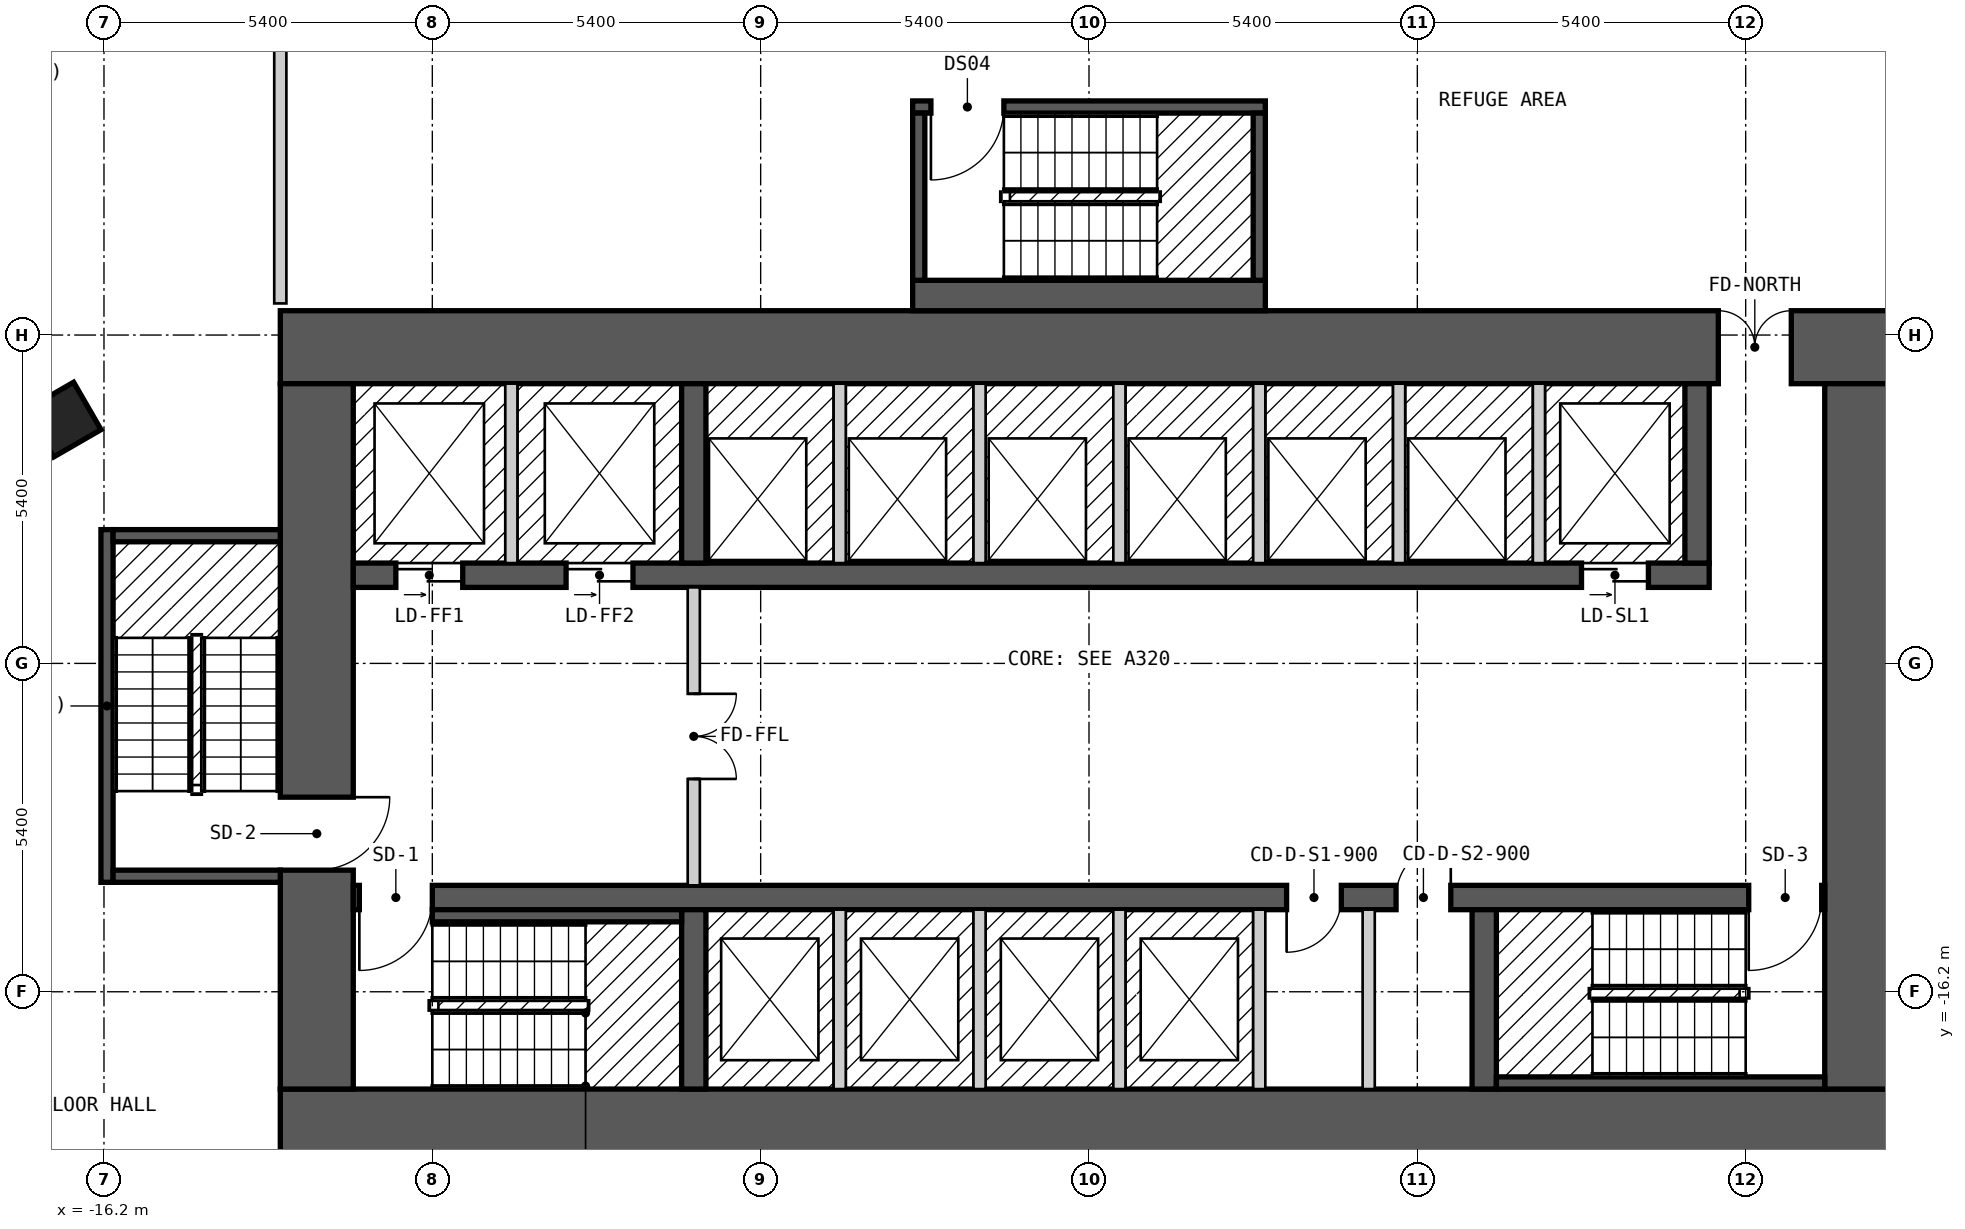
"""IFC4 building model, lengths in metres.
Left out: names, types, materials, properties, quantities, classifications, styles, units other than length and angle.
Written with IfcOpenShell. Run it as: python <this file> out.ifc"""

import sys

from ifc_helpers import new_model, si_unit, direction, frame, frame_2d, origin, origin_2d, place, context, subcontext, project, spatial, rectangle, extrude, element, fill, save


model = new_model("IFC4")
c1 = context("Model", 3, precision=1e-05, world=origin(), true_north=direction((0.0, 1.0)))
c2 = subcontext(c1, "Body", "Model", "MODEL_VIEW")
j1 = project(units=[si_unit("LENGTHUNIT", "METRE"), si_unit("PLANEANGLEUNIT", "RADIAN")], contexts=[c1])
p1 = place(None, origin())
s1 = spatial("IfcSite", under=j1, at=p1, CompositionType="ELEMENT")
p2 = place(p1, origin())
s2 = spatial("IfcBuilding", under=s1, at=p2, CompositionType="ELEMENT")
p3 = place(p2, frame((0.0, 0.0, 62.4)))
s3 = spatial("IfcBuildingStorey", under=s2, at=p3, CompositionType="ELEMENT", Elevation=62.4)
p4 = place(p3, frame((-16.864, -6.791, 0.0), z_axis=(0.0, 0.0, 1.0), x_axis=(0.499984884929, -0.866034130299, 0.0)))
e1 = element("IfcColumn", 1, at=p4, inside=s3, PredefinedType="COLUMN", context=c2, shape_type="SweptSolid", body=[
    extrude(rectangle(XDim=0.9, YDim=0.9, at=origin_2d()), origin(), (0.0, 0.0, 1.0), 3.6),
])
p5 = place(p3, frame((-13.3, -18.4, 0.0), z_axis=(0.0, 0.0, 1.0), x_axis=(1.0, 0.0, 0.0)))
e2 = element("IfcWall", 2, at=p5, inside=s3, PredefinedType="SHEAR", context=c2, shape_type="SweptSolid", body=[
    extrude(rectangle(XDim=26.6, YDim=1.2, at=frame_2d((13.3, 0.0))), origin(), (0.0, 0.0, 1.0), 2.6),
])
p6 = place(p3, frame((-13.3, -5.6, 0.0), z_axis=(0.0, 0.0, 1.0), x_axis=(1.0, 0.0, 0.0)))
e3 = element("IfcWall", 3, at=p6, inside=s3, PredefinedType="SHEAR", context=c2, shape_type="SweptSolid", body=[
    extrude(rectangle(XDim=26.6, YDim=1.2, at=frame_2d((13.3, 0.0))), origin(), (0.0, 0.0, 1.0), 2.6),
])
p7 = place(p6, frame((23.65, 0.0, 0.0)))
e4 = element("IfcOpeningElement", 4, at=p7, cuts=e3, PredefinedType="OPENING", context=c2, shape_type="SweptSolid", body=[
    extrude(rectangle(XDim=1.2, YDim=2.1, at=frame_2d((0.6, 1.05))), frame((0.0, 0.61, 0.0), z_axis=(0.0, -1.0, 0.0), x_axis=(1.0, 0.0, 0.0)), (0.0, 0.0, 1.0), 1.22),
])
p8 = place(p3, frame((-12.7, -17.8, 0.0), z_axis=(0.0, 0.0, 1.0), x_axis=(0.0, 1.0, 0.0)))
e5 = element("IfcWall", 5, at=p8, inside=s3, PredefinedType="SHEAR", context=c2, shape_type="SweptSolid", body=[
    extrude(rectangle(XDim=11.6, YDim=1.2, at=frame_2d((5.8, 0.0))), origin(), (0.0, 0.0, 1.0), 2.6),
])
p9 = place(p8, frame((3.6, 0.0, 0.0)))
e6 = element("IfcOpeningElement", 6, at=p9, cuts=e5, PredefinedType="OPENING", context=c2, shape_type="SweptSolid", body=[
    extrude(rectangle(XDim=1.2, YDim=2.1, at=frame_2d((0.6, 1.05))), frame((0.0, 0.61, 0.0), z_axis=(0.0, -1.0, 0.0), x_axis=(1.0, 0.0, 0.0)), (0.0, 0.0, 1.0), 1.22),
])
p10 = place(p3, frame((12.7, -17.8, 0.0), z_axis=(0.0, 0.0, 1.0), x_axis=(0.0, 1.0, 0.0)))
e7 = element("IfcWall", 7, at=p10, inside=s3, PredefinedType="SHEAR", context=c2, shape_type="SweptSolid", body=[
    extrude(rectangle(XDim=11.6, YDim=1.2, at=frame_2d((5.8, 0.0))), origin(), (0.0, 0.0, 1.0), 2.6),
])
p11 = place(p3, frame((-12.1, -14.65, 0.0), z_axis=(0.0, 0.0, 1.0), x_axis=(1.0, 0.0, 0.0)))
e8 = element("IfcWall", 8, at=p11, inside=s3, PredefinedType="SHEAR", context=c2, shape_type="SweptSolid", body=[
    extrude(rectangle(XDim=24.2, YDim=0.4, at=frame_2d((12.1, 0.0))), origin(), (0.0, 0.0, 1.0), 2.6),
])
p12 = place(p11, frame((1.3, 0.0, 0.0), z_axis=(0.0, 0.0, 1.0), x_axis=(-1.0, 0.0, 0.0)))
e9 = element("IfcOpeningElement", 9, at=p12, cuts=e8, PredefinedType="OPENING", context=c2, shape_type="SweptSolid", body=[
    extrude(rectangle(XDim=1.2, YDim=2.1, at=frame_2d((0.6, 1.05))), frame((0.0, 0.21, 0.0), z_axis=(0.0, -1.0, 0.0), x_axis=(1.0, 0.0, 0.0)), (0.0, 0.0, 1.0), 0.42),
])
p13 = place(p11, frame((24.15, 0.0, 0.0), z_axis=(0.0, 0.0, 1.0), x_axis=(-1.0, 0.0, 0.0)))
e10 = element("IfcOpeningElement", 10, at=p13, cuts=e8, PredefinedType="OPENING", context=c2, shape_type="SweptSolid", body=[
    extrude(rectangle(XDim=1.2, YDim=2.1, at=frame_2d((0.6, 1.05))), frame((0.0, 0.21, 0.0), z_axis=(0.0, -1.0, 0.0), x_axis=(1.0, 0.0, 0.0)), (0.0, 0.0, 1.0), 0.42),
])
p14 = place(p11, frame((16.25, 0.0, 0.0), z_axis=(0.0, 0.0, 1.0), x_axis=(-1.0, 0.0, 0.0)))
e11 = element("IfcOpeningElement", 11, at=p14, cuts=e8, PredefinedType="OPENING", context=c2, shape_type="SweptSolid", body=[
    extrude(rectangle(XDim=0.9, YDim=2.1, at=frame_2d((0.45, 1.05))), frame((0.0, 0.21, 0.0), z_axis=(0.0, -1.0, 0.0), x_axis=(1.0, 0.0, 0.0)), (0.0, 0.0, 1.0), 0.42),
])
p15 = place(p11, frame((18.05, 0.0, 0.0), z_axis=(0.0, 0.0, 1.0), x_axis=(-1.0, 0.0, 0.0)))
e12 = element("IfcOpeningElement", 12, at=p15, cuts=e8, PredefinedType="OPENING", context=c2, shape_type="SweptSolid", body=[
    extrude(rectangle(XDim=0.9, YDim=2.1, at=frame_2d((0.45, 1.05))), frame((0.0, 0.21, 0.0), z_axis=(0.0, -1.0, 0.0), x_axis=(1.0, 0.0, 0.0)), (0.0, 0.0, 1.0), 0.42),
])
p16 = place(p3, frame((-12.1, -9.35, 0.0), z_axis=(0.0, 0.0, 1.0), x_axis=(1.0, 0.0, 0.0)))
e13 = element("IfcWall", 13, at=p16, inside=s3, PredefinedType="SHEAR", context=c2, shape_type="SweptSolid", body=[
    extrude(rectangle(XDim=22.3, YDim=0.4, at=frame_2d((11.15, 0.0))), origin(), (0.0, 0.0, 1.0), 2.6),
])
p17 = place(p16, frame((0.7, 0.0, 0.0)))
e14 = element("IfcOpeningElement", 14, at=p17, cuts=e13, PredefinedType="OPENING", context=c2, shape_type="SweptSolid", body=[
    extrude(rectangle(XDim=1.1, YDim=2.1, at=frame_2d((0.55, 1.05))), frame((0.0, 0.21, 0.0), z_axis=(0.0, -1.0, 0.0), x_axis=(1.0, 0.0, 0.0)), (0.0, 0.0, 1.0), 0.42),
])
p18 = place(p16, frame((3.5, 0.0, 0.0)))
e15 = element("IfcOpeningElement", 15, at=p18, cuts=e13, PredefinedType="OPENING", context=c2, shape_type="SweptSolid", body=[
    extrude(rectangle(XDim=1.1, YDim=2.1, at=frame_2d((0.55, 1.05))), frame((0.0, 0.21, 0.0), z_axis=(0.0, -1.0, 0.0), x_axis=(1.0, 0.0, 0.0)), (0.0, 0.0, 1.0), 0.42),
])
p19 = place(p16, frame((20.2, 0.0, 0.0)))
e16 = element("IfcOpeningElement", 16, at=p19, cuts=e13, PredefinedType="OPENING", context=c2, shape_type="SweptSolid", body=[
    extrude(rectangle(XDim=1.1, YDim=2.1, at=frame_2d((0.55, 1.05))), frame((0.0, 0.21, 0.0), z_axis=(0.0, -1.0, 0.0), x_axis=(1.0, 0.0, 0.0)), (0.0, 0.0, 1.0), 0.42),
])
for number, where, z_axis, x_axis in (
    (17, (-6.5, -17.8, 0.0), (0.0, 0.0, 1.0), (0.0, 1.0, 0.0)),
    (18, (6.5, -17.8, 0.0), (0.0, 0.0, 1.0), (0.0, 1.0, 0.0)),
    (19, (-6.5, -9.15, 0.0), (0.0, 0.0, 1.0), (0.0, 1.0, 0.0)),
    (20, (10.0, -9.15, 0.0), (0.0, 0.0, 1.0), (0.0, 1.0, 0.0)),
):
    element("IfcWall", number, at=place(p3, frame(where, z_axis=z_axis, x_axis=x_axis)), inside=s3, PredefinedType="SHEAR", context=c2, shape_type="SweptSolid", body=[
        extrude(rectangle(XDim=2.95, YDim=0.4, at=frame_2d((1.475, 0.0))), origin(), (0.0, 0.0, 1.0), 2.6),
    ])
p20 = place(p3, frame((-2.9, -4.75, 0.0), z_axis=(0.0, 0.0, 1.0), x_axis=(1.0, 0.0, 0.0)))
e21 = element("IfcWall", 21, at=p20, inside=s3, PredefinedType="SOLIDWALL", context=c2, shape_type="SweptSolid", body=[
    extrude(rectangle(XDim=5.8, YDim=0.5, at=frame_2d((2.9, 0.0))), origin(), (0.0, 0.0, 1.0), 2.6),
])
p21 = place(p3, frame((-2.9, -1.65, 0.0), z_axis=(0.0, 0.0, 1.0), x_axis=(1.0, 0.0, 0.0)))
e22 = element("IfcWall", 22, at=p21, inside=s3, PredefinedType="SOLIDWALL", context=c2, shape_type="SweptSolid", body=[
    extrude(rectangle(XDim=5.8, YDim=0.2, at=frame_2d((2.9, 0.0))), origin(), (0.0, 0.0, 1.0), 2.6),
])
p22 = place(p21, frame((0.3, 0.0, 0.0)))
e23 = element("IfcOpeningElement", 23, at=p22, cuts=e22, PredefinedType="OPENING", context=c2, shape_type="SweptSolid", body=[
    extrude(rectangle(XDim=1.2, YDim=2.1, at=frame_2d((0.6, 1.05))), frame((0.0, 0.11, 0.0), z_axis=(0.0, -1.0, 0.0), x_axis=(1.0, 0.0, 0.0)), (0.0, 0.0, 1.0), 0.22),
])
for number, where, z_axis, x_axis in (
    (24, (-2.8, -4.5, 0.0), (0.0, 0.0, 1.0), (0.0, 1.0, 0.0)),
    (25, (2.8, -4.5, 0.0), (0.0, 0.0, 1.0), (0.0, 1.0, 0.0)),
):
    element("IfcWall", number, at=place(p3, frame(where, z_axis=z_axis, x_axis=x_axis)), inside=s3, PredefinedType="SOLIDWALL", context=c2, shape_type="SweptSolid", body=[
        extrude(rectangle(XDim=2.75, YDim=0.2, at=frame_2d((1.375, 0.0))), origin(), (0.0, 0.0, 1.0), 2.6),
    ])
p23 = place(p3, frame((-13.3, -4.88, 0.0), z_axis=(0.0, 0.0, 1.0), x_axis=(0.0, 1.0, 0.0)))
e26 = element("IfcWall", 26, at=p23, inside=s3, PredefinedType="PARTITIONING", context=c2, shape_type="SweptSolid", body=[
    extrude(rectangle(XDim=6.78, YDim=0.2, at=frame_2d((3.39, 0.0))), origin(), (0.0, 0.0, 1.0), 2.6),
])
p24 = place(p3, frame((-16.15, -14.4, 0.0), z_axis=(0.0, 0.0, 1.0), x_axis=(0.0, 1.0, 0.0)))
e27 = element("IfcWall", 27, at=p24, inside=s3, PredefinedType="SOLIDWALL", context=c2, shape_type="SweptSolid", body=[
    extrude(rectangle(XDim=5.8, YDim=0.2, at=frame_2d((2.9, 0.0))), origin(), (0.0, 0.0, 1.0), 2.6),
])
for number, where, z_axis, x_axis in (
    (28, (-16.05, -14.3, 0.0), (0.0, 0.0, 1.0), (1.0, 0.0, 0.0)),
    (29, (-16.05, -8.7, 0.0), (0.0, 0.0, 1.0), (1.0, 0.0, 0.0)),
):
    element("IfcWall", number, at=place(p3, frame(where, z_axis=z_axis, x_axis=x_axis)), inside=s3, PredefinedType="SOLIDWALL", context=c2, shape_type="SweptSolid", body=[
        extrude(rectangle(XDim=2.75, YDim=0.2, at=frame_2d((1.375, 0.0))), origin(), (0.0, 0.0, 1.0), 2.6),
    ])
p25 = place(p3, frame((-10.8, -14.95, 0.0), z_axis=(0.0, 0.0, 1.0), x_axis=(1.0, 0.0, 0.0)))
e30 = element("IfcWall", 30, at=p25, inside=s3, PredefinedType="SOLIDWALL", context=c2, shape_type="SweptSolid", body=[
    extrude(rectangle(XDim=4.1, YDim=0.2, at=frame_2d((2.05, 0.0))), origin(), (0.0, 0.0, 1.0), 2.6),
])
p26 = place(p3, frame((-9.5, -9.15, 0.0), z_axis=(0.0, 0.0, 1.0), x_axis=(0.0, 1.0, 0.0)))
e31 = element("IfcWall", 31, at=p26, inside=s3, PredefinedType="SOLIDWALL", context=c2, shape_type="SweptSolid", body=[
    extrude(rectangle(XDim=2.95, YDim=0.2, at=frame_2d((1.475, 0.0))), origin(), (0.0, 0.0, 1.0), 2.6),
])
p27 = place(p3, frame((-6.5, -14.45, 0.0), z_axis=(0.0, 0.0, 1.0), x_axis=(0.0, 1.0, 0.0)))
e32 = element("IfcWall", 32, at=p27, inside=s3, PredefinedType="PARTITIONING", context=c2, shape_type="SweptSolid", body=[
    extrude(rectangle(XDim=4.9, YDim=0.2, at=frame_2d((2.45, 0.0))), origin(), (0.0, 0.0, 1.0), 2.6),
])
p28 = place(p27, frame((3.15, 0.0, 0.0), z_axis=(0.0, 0.0, 1.0), x_axis=(-1.0, 0.0, 0.0)))
e33 = element("IfcOpeningElement", 33, at=p28, cuts=e32, PredefinedType="OPENING", context=c2, shape_type="SweptSolid", body=[
    extrude(rectangle(XDim=1.4, YDim=2.1, at=frame_2d((0.7, 1.05))), frame((0.0, 0.11, 0.0), z_axis=(0.0, -1.0, 0.0), x_axis=(1.0, 0.0, 0.0)), (0.0, 0.0, 1.0), 0.22),
])
for number, where, z_axis, x_axis in (
    (34, (-4.1, -17.8, 0.0), (0.0, 0.0, 1.0), (0.0, 1.0, 0.0)),
    (35, (-4.1, -9.15, 0.0), (0.0, 0.0, 1.0), (0.0, 1.0, 0.0)),
    (36, (-1.8, -17.8, 0.0), (0.0, 0.0, 1.0), (0.0, 1.0, 0.0)),
    (37, (-1.8, -9.15, 0.0), (0.0, 0.0, 1.0), (0.0, 1.0, 0.0)),
    (38, (0.5, -17.8, 0.0), (0.0, 0.0, 1.0), (0.0, 1.0, 0.0)),
    (39, (0.5, -9.15, 0.0), (0.0, 0.0, 1.0), (0.0, 1.0, 0.0)),
    (40, (2.8, -17.8, 0.0), (0.0, 0.0, 1.0), (0.0, 1.0, 0.0)),
    (41, (2.8, -9.15, 0.0), (0.0, 0.0, 1.0), (0.0, 1.0, 0.0)),
):
    element("IfcWall", number, at=place(p3, frame(where, z_axis=z_axis, x_axis=x_axis)), inside=s3, PredefinedType="SOLIDWALL", context=c2, shape_type="SweptSolid", body=[
        extrude(rectangle(XDim=2.95, YDim=0.2, at=frame_2d((1.475, 0.0))), origin(), (0.0, 0.0, 1.0), 2.6),
    ])
p29 = place(p3, frame((4.6, -17.8, 0.0), z_axis=(0.0, 0.0, 1.0), x_axis=(0.0, 1.0, 0.0)))
e42 = element("IfcWall", 42, at=p29, inside=s3, PredefinedType="PARTITIONING", context=c2, shape_type="SweptSolid", body=[
    extrude(rectangle(XDim=2.95, YDim=0.2, at=frame_2d((1.475, 0.0))), origin(), (0.0, 0.0, 1.0), 2.6),
])
p30 = place(p3, frame((5.1, -9.15, 0.0), z_axis=(0.0, 0.0, 1.0), x_axis=(0.0, 1.0, 0.0)))
e43 = element("IfcWall", 43, at=p30, inside=s3, PredefinedType="SOLIDWALL", context=c2, shape_type="SweptSolid", body=[
    extrude(rectangle(XDim=2.95, YDim=0.2, at=frame_2d((1.475, 0.0))), origin(), (0.0, 0.0, 1.0), 2.6),
])
p31 = place(p3, frame((6.7, -17.7, 0.0), z_axis=(0.0, 0.0, 1.0), x_axis=(1.0, 0.0, 0.0)))
e44 = element("IfcWall", 44, at=p31, inside=s3, PredefinedType="SOLIDWALL", context=c2, shape_type="SweptSolid", body=[
    extrude(rectangle(XDim=5.4, YDim=0.2, at=frame_2d((2.7, 0.0))), origin(), (0.0, 0.0, 1.0), 2.6),
])
p32 = place(p3, frame((7.4, -9.15, 0.0), z_axis=(0.0, 0.0, 1.0), x_axis=(0.0, 1.0, 0.0)))
e45 = element("IfcWall", 45, at=p32, inside=s3, PredefinedType="SOLIDWALL", context=c2, shape_type="SweptSolid", body=[
    extrude(rectangle(XDim=2.95, YDim=0.2, at=frame_2d((1.475, 0.0))), origin(), (0.0, 0.0, 1.0), 2.6),
])
p33 = place(p22, origin())
e46 = element("IfcDoor", 46, at=p33, inside=s3, OperationType="SINGLE_SWING_LEFT", PredefinedType="DOOR", context=c2, shape_type="SweptSolid", body=[
    extrude(rectangle(XDim=1.2, YDim=2.1, at=frame_2d((0.6, 1.05))), frame((0.0, 0.025, 0.0), z_axis=(0.0, -1.0, 0.0), x_axis=(1.0, 0.0, 0.0)), (0.0, 0.0, 1.0), 0.05),
])
fill(e23, e46)
p34 = place(p17, origin())
e47 = element("IfcDoor", 47, at=p34, inside=s3, OperationType="DOUBLE_DOOR_SLIDING", PredefinedType="DOOR", context=c2, shape_type="SweptSolid", body=[
    extrude(rectangle(XDim=1.1, YDim=2.1, at=frame_2d((0.55, 1.05))), frame((0.0, 0.025, 0.0), z_axis=(0.0, -1.0, 0.0), x_axis=(1.0, 0.0, 0.0)), (0.0, 0.0, 1.0), 0.05),
])
fill(e14, e47)
p35 = place(p18, origin())
e48 = element("IfcDoor", 48, at=p35, inside=s3, OperationType="DOUBLE_DOOR_SLIDING", PredefinedType="DOOR", context=c2, shape_type="SweptSolid", body=[
    extrude(rectangle(XDim=1.1, YDim=2.1, at=frame_2d((0.55, 1.05))), frame((0.0, 0.025, 0.0), z_axis=(0.0, -1.0, 0.0), x_axis=(1.0, 0.0, 0.0)), (0.0, 0.0, 1.0), 0.05),
])
fill(e15, e48)
p36 = place(p19, origin())
e49 = element("IfcDoor", 49, at=p36, inside=s3, OperationType="DOUBLE_DOOR_SLIDING", PredefinedType="DOOR", context=c2, shape_type="SweptSolid", body=[
    extrude(rectangle(XDim=1.1, YDim=2.1, at=frame_2d((0.55, 1.05))), frame((0.0, 0.025, 0.0), z_axis=(0.0, -1.0, 0.0), x_axis=(1.0, 0.0, 0.0)), (0.0, 0.0, 1.0), 0.05),
])
fill(e16, e49)
p37 = place(p12, origin())
e50 = element("IfcDoor", 50, at=p37, inside=s3, OperationType="SINGLE_SWING_RIGHT", PredefinedType="DOOR", context=c2, shape_type="SweptSolid", body=[
    extrude(rectangle(XDim=1.2, YDim=2.1, at=frame_2d((0.6, 1.05))), frame((0.0, 0.025, 0.0), z_axis=(0.0, -1.0, 0.0), x_axis=(1.0, 0.0, 0.0)), (0.0, 0.0, 1.0), 0.05),
])
fill(e9, e50)
p38 = place(p13, origin())
e51 = element("IfcDoor", 51, at=p38, inside=s3, OperationType="SINGLE_SWING_RIGHT", PredefinedType="DOOR", context=c2, shape_type="SweptSolid", body=[
    extrude(rectangle(XDim=1.2, YDim=2.1, at=frame_2d((0.6, 1.05))), frame((0.0, 0.025, 0.0), z_axis=(0.0, -1.0, 0.0), x_axis=(1.0, 0.0, 0.0)), (0.0, 0.0, 1.0), 0.05),
])
fill(e10, e51)
p39 = place(p9, origin())
e52 = element("IfcDoor", 52, at=p39, inside=s3, OperationType="SINGLE_SWING_RIGHT", PredefinedType="DOOR", context=c2, shape_type="SweptSolid", body=[
    extrude(rectangle(XDim=1.2, YDim=2.1, at=frame_2d((0.6, 1.05))), frame((0.0, 0.025, 0.0), z_axis=(0.0, -1.0, 0.0), x_axis=(1.0, 0.0, 0.0)), (0.0, 0.0, 1.0), 0.05),
])
fill(e6, e52)
p40 = place(p28, origin())
e53 = element("IfcDoor", 53, at=p40, inside=s3, OperationType="DOUBLE_DOOR_SINGLE_SWING", PredefinedType="DOOR", context=c2, shape_type="SweptSolid", body=[
    extrude(rectangle(XDim=1.4, YDim=2.1, at=frame_2d((0.7, 1.05))), frame((0.0, 0.025, 0.0), z_axis=(0.0, -1.0, 0.0), x_axis=(1.0, 0.0, 0.0)), (0.0, 0.0, 1.0), 0.05),
])
fill(e33, e53)
p41 = place(p7, origin())
e54 = element("IfcDoor", 54, at=p41, inside=s3, OperationType="DOUBLE_DOOR_SINGLE_SWING", PredefinedType="DOOR", context=c2, shape_type="SweptSolid", body=[
    extrude(rectangle(XDim=1.2, YDim=2.1, at=frame_2d((0.6, 1.05))), frame((0.0, 0.025, 0.0), z_axis=(0.0, -1.0, 0.0), x_axis=(1.0, 0.0, 0.0)), (0.0, 0.0, 1.0), 0.05),
])
fill(e4, e54)
p42 = place(p14, origin())
e55 = element("IfcDoor", 55, at=p42, inside=s3, OperationType="SINGLE_SWING_RIGHT", PredefinedType="DOOR", context=c2, shape_type="SweptSolid", body=[
    extrude(rectangle(XDim=0.9, YDim=2.1, at=frame_2d((0.45, 1.05))), frame((0.0, 0.025, 0.0), z_axis=(0.0, -1.0, 0.0), x_axis=(1.0, 0.0, 0.0)), (0.0, 0.0, 1.0), 0.05),
])
fill(e11, e55)
p43 = place(p15, origin())
e56 = element("IfcDoor", 56, at=p43, inside=s3, OperationType="SINGLE_SWING_LEFT", PredefinedType="DOOR", context=c2, shape_type="SweptSolid", body=[
    extrude(rectangle(XDim=0.9, YDim=2.1, at=frame_2d((0.45, 1.05))), frame((0.0, 0.025, 0.0), z_axis=(0.0, -1.0, 0.0), x_axis=(1.0, 0.0, 0.0)), (0.0, 0.0, 1.0), 0.05),
])
fill(e12, e56)
save(model, sys.argv[1])
